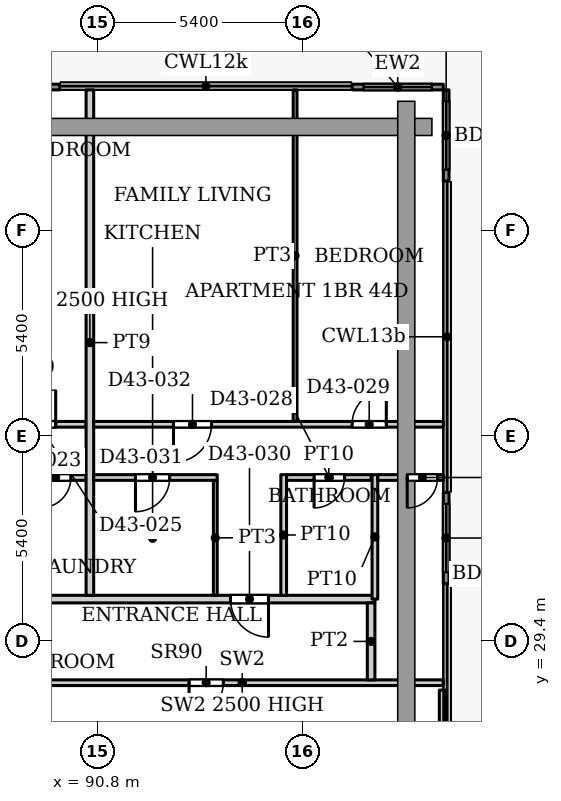
"""IFC4 building model, lengths in metres.
Left out: names, types, materials, properties, quantities, classifications, styles, units other than length and angle.
Written with IfcOpenShell. Run it as: python <this file> out.ifc"""

import sys

from ifc_helpers import new_model, si_unit, direction, frame, frame_2d, origin, place, context, subcontext, project, spatial, rectangle, extrude, source, transform, mapped, element, fill, save


model = new_model("IFC4")
c1 = context("Model", 3, precision=1e-05, world=origin(), true_north=direction((0.0, 1.0)))
c2 = subcontext(c1, "Body", "Model", "MODEL_VIEW")
j1 = project(units=[si_unit("LENGTHUNIT", "METRE"), si_unit("PLANEANGLEUNIT", "RADIAN")], contexts=[c1])
p1 = place(None, origin())
s1 = spatial("IfcSite", under=j1, at=p1, CompositionType="ELEMENT")
p2 = place(p1, origin())
s2 = spatial("IfcBuilding", under=s1, at=p2, CompositionType="ELEMENT")
p3 = place(p2, frame((0.0, 0.0, 187.7)))
s3 = spatial("IfcBuildingStorey", under=s2, at=p3, CompositionType="ELEMENT", Elevation=187.7)
p4 = place(p3, frame((87.406, 43.975, 0.0), z_axis=(0.0, 0.0, 1.0), x_axis=(1.0, 0.0, 0.0)))
e1 = element("IfcWall", 1, at=p4, inside=s3, PredefinedType="SOLIDWALL", context=c2, shape_type="SweptSolid", body=[
    extrude(rectangle(XDim=2.4, YDim=0.15, at=frame_2d((1.2, 0.0))), origin(), (0.0, 0.0, 1.0), 3.75),
])
p5 = place(p4, frame((0.3, 0.0, 0.0)))
e2 = element("IfcOpeningElement", 2, at=p5, cuts=e1, PredefinedType="OPENING", context=c2, shape_type="SweptSolid", body=[
    extrude(rectangle(XDim=1.8, YDim=2.4, at=frame_2d((0.9, 1.2))), frame((0.0, 0.085, 0.0), z_axis=(0.0, -1.0, 0.0), x_axis=(1.0, 0.0, 0.0)), (0.0, 0.0, 1.0), 0.17),
])
p6 = place(p3, frame((97.5, 43.975, 0.0), z_axis=(0.0, 0.0, 1.0), x_axis=(1.0, 0.0, 0.0)))
e3 = element("IfcWall", 3, at=p6, inside=s3, PredefinedType="SOLIDWALL", context=c2, shape_type="SweptSolid", body=[
    extrude(rectangle(XDim=2.4, YDim=0.15, at=frame_2d((1.2, 0.0))), origin(), (0.0, 0.0, 1.0), 3.75),
])
p7 = place(p6, frame((0.3, 0.0, 0.0)))
e4 = element("IfcOpeningElement", 4, at=p7, cuts=e3, PredefinedType="OPENING", context=c2, shape_type="SweptSolid", body=[
    extrude(rectangle(XDim=1.8, YDim=2.4, at=frame_2d((0.9, 1.2))), frame((0.0, 0.085, 0.0), z_axis=(0.0, -1.0, 0.0), x_axis=(1.0, 0.0, 0.0)), (0.0, 0.0, 1.0), 0.17),
])
p8 = place(p3, frame((99.975, 43.9, 0.0), z_axis=(0.0, 0.0, 1.0), x_axis=(0.0, -1.0, 0.0)))
e5 = element("IfcWall", 5, at=p8, inside=s3, PredefinedType="SOLIDWALL", context=c2, shape_type="SweptSolid", body=[
    extrude(rectangle(XDim=2.4, YDim=0.15, at=frame_2d((1.2, 0.0))), origin(), (0.0, 0.0, 1.0), 3.75),
])
p9 = place(p8, frame((0.3, 0.0, 0.0)))
e6 = element("IfcOpeningElement", 6, at=p9, cuts=e5, PredefinedType="OPENING", context=c2, shape_type="SweptSolid", body=[
    extrude(rectangle(XDim=1.8, YDim=2.4, at=frame_2d((0.9, 1.2))), frame((0.0, 0.085, 0.0), z_axis=(0.0, -1.0, 0.0), x_axis=(1.0, 0.0, 0.0)), (0.0, 0.0, 1.0), 0.17),
])
p10 = place(p3, frame((99.975, 33.307, 0.0), z_axis=(0.0, 0.0, 1.0), x_axis=(0.0, -1.0, 0.0)))
e7 = element("IfcWall", 7, at=p10, inside=s3, PredefinedType="SOLIDWALL", context=c2, shape_type="SweptSolid", body=[
    extrude(rectangle(XDim=2.4, YDim=0.15, at=frame_2d((1.2, 0.0))), origin(), (0.0, 0.0, 1.0), 3.75),
])
p11 = place(p10, frame((0.3, 0.0, 0.0)))
e8 = element("IfcOpeningElement", 8, at=p11, cuts=e7, PredefinedType="OPENING", context=c2, shape_type="SweptSolid", body=[
    extrude(rectangle(XDim=1.8, YDim=2.4, at=frame_2d((0.9, 1.2))), frame((0.0, 0.085, 0.0), z_axis=(0.0, -1.0, 0.0), x_axis=(1.0, 0.0, 0.0)), (0.0, 0.0, 1.0), 0.17),
])
p12 = place(p3, frame((89.32, 28.3, 0.0), z_axis=(0.0, 0.0, 1.0), x_axis=(1.0, 0.0, 0.0)))
e9 = element("IfcWall", 9, at=p12, inside=s3, PredefinedType="PARTITIONING", context=c2, shape_type="SweptSolid", body=[
    extrude(rectangle(XDim=10.578, YDim=0.15, at=frame_2d((5.289, 0.0))), origin(), (0.0, 0.0, 1.0), 2.5),
])
p13 = place(p12, frame((3.89, 0.0, 0.0)))
e10 = element("IfcOpeningElement", 10, at=p13, cuts=e9, PredefinedType="OPENING", context=c2, shape_type="SweptSolid", body=[
    extrude(rectangle(XDim=0.9, YDim=2.2, at=frame_2d((0.45, 1.1))), frame((0.0, 0.085, 0.0), z_axis=(0.0, -1.0, 0.0), x_axis=(1.0, 0.0, 0.0)), (0.0, 0.0, 1.0), 0.17),
])
p14 = place(p3, frame((99.87, 21.015, 0.0), z_axis=(0.0, 0.0, 1.0), x_axis=(0.0, 1.0, 0.0)))
e11 = element("IfcWall", 11, at=p14, inside=s3, PredefinedType="PARTITIONING", context=c2, shape_type="SweptSolid", body=[
    extrude(rectangle(XDim=7.09, YDim=0.15, at=frame_2d((3.545, 0.0))), origin(), (0.0, 0.0, 1.0), 3.9),
])
p15 = place(p3, frame((53.549, 30.5, 0.0), z_axis=(0.0, 0.0, 1.0), x_axis=(1.0, 0.0, 0.0)))
e12 = element("IfcWall", 12, at=p15, inside=s3, PredefinedType="PARTITIONING", context=c2, shape_type="SweptSolid", body=[
    extrude(rectangle(XDim=44.551, YDim=0.2, at=frame_2d((22.275, 0.0))), origin(), (0.0, 0.0, 1.0), 3.6),
])
p16 = place(p15, frame((8.351, 0.0, 0.0)))
e13 = element("IfcOpeningElement", 13, at=p16, cuts=e12, PredefinedType="OPENING", context=c2, shape_type="SweptSolid", body=[
    extrude(rectangle(XDim=1.0, YDim=2.1, at=frame_2d((0.5, 1.05))), frame((0.0, 0.11, 0.0), z_axis=(0.0, -1.0, 0.0), x_axis=(1.0, 0.0, 0.0)), (0.0, 0.0, 1.0), 0.22),
])
p17 = place(p15, frame((12.551, 0.0, 0.0)))
e14 = element("IfcOpeningElement", 14, at=p17, cuts=e12, PredefinedType="OPENING", context=c2, shape_type="SweptSolid", body=[
    extrude(rectangle(XDim=1.0, YDim=2.1, at=frame_2d((0.5, 1.05))), frame((0.0, 0.11, 0.0), z_axis=(0.0, -1.0, 0.0), x_axis=(1.0, 0.0, 0.0)), (0.0, 0.0, 1.0), 0.22),
])
p18 = place(p15, frame((28.751, 0.0, 0.0)))
e15 = element("IfcOpeningElement", 15, at=p18, cuts=e12, PredefinedType="OPENING", context=c2, shape_type="SweptSolid", body=[
    extrude(rectangle(XDim=1.0, YDim=2.1, at=frame_2d((0.5, 1.05))), frame((0.0, 0.11, 0.0), z_axis=(0.0, -1.0, 0.0), x_axis=(1.0, 0.0, 0.0)), (0.0, 0.0, 1.0), 0.22),
])
p19 = place(p15, frame((40.751, 0.0, 0.0)))
e16 = element("IfcOpeningElement", 16, at=p19, cuts=e12, PredefinedType="OPENING", context=c2, shape_type="SweptSolid", body=[
    extrude(rectangle(XDim=1.0, YDim=2.1, at=frame_2d((0.5, 1.05))), frame((0.0, 0.11, 0.0), z_axis=(0.0, -1.0, 0.0), x_axis=(1.0, 0.0, 0.0)), (0.0, 0.0, 1.0), 0.22),
])
p20 = place(p3, frame((79.0, 35.1, 0.0), z_axis=(0.0, 0.0, 1.0), x_axis=(1.0, 0.0, 0.0)))
e17 = element("IfcWall", 17, at=p20, inside=s3, PredefinedType="PARTITIONING", context=c2, shape_type="SweptSolid", body=[
    extrude(rectangle(XDim=11.5, YDim=0.15, at=frame_2d((5.75, 0.0))), origin(), (0.0, 0.0, 1.0), 3.6),
])
p21 = place(p20, frame((0.95, 0.0, 0.0)))
e18 = element("IfcOpeningElement", 18, at=p21, cuts=e17, PredefinedType="OPENING", context=c2, shape_type="SweptSolid", body=[
    extrude(rectangle(XDim=0.9, YDim=2.1, at=frame_2d((0.45, 1.05))), frame((0.0, 0.085, 0.0), z_axis=(0.0, -1.0, 0.0), x_axis=(1.0, 0.0, 0.0)), (0.0, 0.0, 1.0), 0.17),
])
p22 = place(p20, frame((4.35, 0.0, 0.0)))
e19 = element("IfcOpeningElement", 19, at=p22, cuts=e17, PredefinedType="OPENING", context=c2, shape_type="SweptSolid", body=[
    extrude(rectangle(XDim=1.0, YDim=2.1, at=frame_2d((0.5, 1.05))), frame((0.0, 0.085, 0.0), z_axis=(0.0, -1.0, 0.0), x_axis=(1.0, 0.0, 0.0)), (0.0, 0.0, 1.0), 0.17),
])
p23 = place(p20, frame((9.8, 0.0, 0.0)))
e20 = element("IfcOpeningElement", 20, at=p23, cuts=e17, PredefinedType="OPENING", context=c2, shape_type="SweptSolid", body=[
    extrude(rectangle(XDim=0.9, YDim=2.1, at=frame_2d((0.45, 1.05))), frame((0.0, 0.085, 0.0), z_axis=(0.0, -1.0, 0.0), x_axis=(1.0, 0.0, 0.0)), (0.0, 0.0, 1.0), 0.17),
])
p24 = place(p3, frame((83.625, 33.7, 0.0), z_axis=(0.0, 0.0, 1.0), x_axis=(1.0, 0.0, 0.0)))
e21 = element("IfcWall", 21, at=p24, inside=s3, PredefinedType="PARTITIONING", context=c2, shape_type="SweptSolid", body=[
    extrude(rectangle(XDim=6.875, YDim=0.15, at=frame_2d((3.438, 0.0))), origin(), (0.0, 0.0, 1.0), 3.6),
])
p25 = place(p24, frame((3.725, 0.0, 0.0)))
e22 = element("IfcOpeningElement", 22, at=p25, cuts=e21, PredefinedType="OPENING", context=c2, shape_type="SweptSolid", body=[
    extrude(rectangle(XDim=0.8, YDim=2.1, at=frame_2d((0.4, 1.05))), frame((0.0, 0.085, 0.0), z_axis=(0.0, -1.0, 0.0), x_axis=(1.0, 0.0, 0.0)), (0.0, 0.0, 1.0), 0.17),
])
p26 = place(p24, frame((5.675, 0.0, 0.0)))
e23 = element("IfcOpeningElement", 23, at=p26, cuts=e21, PredefinedType="OPENING", context=c2, shape_type="SweptSolid", body=[
    extrude(rectangle(XDim=0.8, YDim=2.1, at=frame_2d((0.4, 1.05))), frame((0.0, 0.085, 0.0), z_axis=(0.0, -1.0, 0.0), x_axis=(1.0, 0.0, 0.0)), (0.0, 0.0, 1.0), 0.17),
])
p27 = place(p24, frame((1.925, 0.0, 0.0)))
e24 = element("IfcOpeningElement", 24, at=p27, cuts=e21, PredefinedType="OPENING", context=c2, shape_type="SweptSolid", body=[
    extrude(rectangle(XDim=0.8, YDim=2.1, at=frame_2d((0.4, 1.05))), frame((0.0, 0.085, 0.0), z_axis=(0.0, -1.0, 0.0), x_axis=(1.0, 0.0, 0.0)), (0.0, 0.0, 1.0), 0.17),
])
p28 = place(p24, frame((0.425, 0.0, 0.0)))
e25 = element("IfcOpeningElement", 25, at=p28, cuts=e21, PredefinedType="OPENING", context=c2, shape_type="SweptSolid", body=[
    extrude(rectangle(XDim=0.8, YDim=2.1, at=frame_2d((0.4, 1.05))), frame((0.0, 0.085, 0.0), z_axis=(0.0, -1.0, 0.0), x_axis=(1.0, 0.0, 0.0)), (0.0, 0.0, 1.0), 0.17),
])
p29 = place(p3, frame((90.6, 30.6, 0.0), z_axis=(0.0, 0.0, 1.0), x_axis=(0.0, 1.0, 0.0)))
e26 = element("IfcWall", 26, at=p29, inside=s3, PredefinedType="PARTITIONING", context=c2, shape_type="SweptSolid", body=[
    extrude(rectangle(XDim=13.3, YDim=0.2, at=frame_2d((6.65, 0.0))), origin(), (0.0, 0.0, 1.0), 2.5),
])
p30 = place(p3, frame((90.7, 33.7, 0.0), z_axis=(0.0, 0.0, 1.0), x_axis=(1.0, 0.0, 0.0)))
e27 = element("IfcWall", 27, at=p30, inside=s3, PredefinedType="PARTITIONING", context=c2, shape_type="SweptSolid", body=[
    extrude(rectangle(XDim=3.25, YDim=0.15, at=frame_2d((1.625, 0.0))), origin(), (0.0, 0.0, 1.0), 3.6),
])
p31 = place(p30, frame((1.1, 0.0, 0.0)))
e28 = element("IfcOpeningElement", 28, at=p31, cuts=e27, PredefinedType="OPENING", context=c2, shape_type="SweptSolid", body=[
    extrude(rectangle(XDim=0.9, YDim=2.1, at=frame_2d((0.45, 1.05))), frame((0.0, 0.085, 0.0), z_axis=(0.0, -1.0, 0.0), x_axis=(1.0, 0.0, 0.0)), (0.0, 0.0, 1.0), 0.17),
])
p32 = place(p3, frame((90.7, 35.1, 0.0), z_axis=(0.0, 0.0, 1.0), x_axis=(1.0, 0.0, 0.0)))
e29 = element("IfcWall", 29, at=p32, inside=s3, PredefinedType="PARTITIONING", context=c2, shape_type="SweptSolid", body=[
    extrude(rectangle(XDim=9.2, YDim=0.15, at=frame_2d((4.6, 0.0))), origin(), (0.0, 0.0, 1.0), 3.6),
])
p33 = place(p32, frame((6.8, 0.0, 0.0)))
e30 = element("IfcOpeningElement", 30, at=p33, cuts=e29, PredefinedType="OPENING", context=c2, shape_type="SweptSolid", body=[
    extrude(rectangle(XDim=0.9, YDim=2.1, at=frame_2d((0.45, 1.05))), frame((0.0, 0.085, 0.0), z_axis=(0.0, -1.0, 0.0), x_axis=(1.0, 0.0, 0.0)), (0.0, 0.0, 1.0), 0.17),
])
p34 = place(p32, frame((2.1, 0.0, 0.0)))
e31 = element("IfcOpeningElement", 31, at=p34, cuts=e29, PredefinedType="OPENING", context=c2, shape_type="SweptSolid", body=[
    extrude(rectangle(XDim=1.0, YDim=2.1, at=frame_2d((0.5, 1.05))), frame((0.0, 0.085, 0.0), z_axis=(0.0, -1.0, 0.0), x_axis=(1.0, 0.0, 0.0)), (0.0, 0.0, 1.0), 0.17),
])
p35 = place(p3, frame((93.9, 30.6, 0.0), z_axis=(0.0, 0.0, 1.0), x_axis=(0.0, 1.0, 0.0)))
e32 = element("IfcWall", 32, at=p35, inside=s3, PredefinedType="PARTITIONING", context=c2, shape_type="SweptSolid", body=[
    extrude(rectangle(XDim=3.025, YDim=0.1, at=frame_2d((1.512, 0.0))), origin(), (0.0, 0.0, 1.0), 3.6),
])
p36 = place(p3, frame((95.7, 30.6, 0.0), z_axis=(0.0, 0.0, 1.0), x_axis=(0.0, 1.0, 0.0)))
e33 = element("IfcWall", 33, at=p36, inside=s3, PredefinedType="PARTITIONING", context=c2, shape_type="SweptSolid", body=[
    extrude(rectangle(XDim=3.175, YDim=0.15, at=frame_2d((1.587, 0.0))), origin(), (0.0, 0.0, 1.0), 3.6),
])
p37 = place(p3, frame((95.775, 33.7, 0.0), z_axis=(0.0, 0.0, 1.0), x_axis=(1.0, 0.0, 0.0)))
e34 = element("IfcWall", 34, at=p37, inside=s3, PredefinedType="PARTITIONING", context=c2, shape_type="SweptSolid", body=[
    extrude(rectangle(XDim=2.225, YDim=0.15, at=frame_2d((1.113, 0.0))), origin(), (0.0, 0.0, 1.0), 3.6),
])
p38 = place(p37, frame((0.725, 0.0, 0.0)))
e35 = element("IfcOpeningElement", 35, at=p38, cuts=e34, PredefinedType="OPENING", context=c2, shape_type="SweptSolid", body=[
    extrude(rectangle(XDim=0.8, YDim=2.1, at=frame_2d((0.4, 1.05))), frame((0.0, 0.085, 0.0), z_axis=(0.0, -1.0, 0.0), x_axis=(1.0, 0.0, 0.0)), (0.0, 0.0, 1.0), 0.17),
])
p39 = place(p3, frame((96.0, 35.175, 0.0), z_axis=(0.0, 0.0, 1.0), x_axis=(0.0, 1.0, 0.0)))
e36 = element("IfcWall", 36, at=p39, inside=s3, PredefinedType="PARTITIONING", context=c2, shape_type="SweptSolid", body=[
    extrude(rectangle(XDim=8.725, YDim=0.1, at=frame_2d((4.362, 0.0))), origin(), (0.0, 0.0, 1.0), 3.6),
])
p40 = place(p3, frame((98.0, 28.374, 0.0), z_axis=(0.0, 0.0, 1.0), x_axis=(0.0, 1.0, 0.0)))
e37 = element("IfcWall", 37, at=p40, inside=s3, PredefinedType="PARTITIONING", context=c2, shape_type="SweptSolid", body=[
    extrude(rectangle(XDim=2.026, YDim=0.2, at=frame_2d((1.013, 0.0))), origin(), (0.0, 0.0, 1.0), 3.6),
])
p41 = place(p3, frame((98.1, 30.5, 0.0), z_axis=(0.0, 0.0, 1.0), x_axis=(0.0, 1.0, 0.0)))
e38 = element("IfcWall", 38, at=p41, inside=s3, PredefinedType="PARTITIONING", context=c2, shape_type="SweptSolid", body=[
    extrude(rectangle(XDim=3.275, YDim=0.15, at=frame_2d((1.637, 0.0))), origin(), (0.0, 0.0, 1.0), 3.6),
])
p42 = place(p3, frame((98.175, 33.7, 0.0), z_axis=(0.0, 0.0, 1.0), x_axis=(1.0, 0.0, 0.0)))
e39 = element("IfcWall", 39, at=p42, inside=s3, PredefinedType="PARTITIONING", context=c2, shape_type="SweptSolid", body=[
    extrude(rectangle(XDim=1.725, YDim=0.15, at=frame_2d((0.862, 0.0))), origin(), (0.0, 0.0, 1.0), 3.6),
])
p43 = place(p42, frame((0.775, 0.0, 0.0)))
e40 = element("IfcOpeningElement", 40, at=p43, cuts=e39, PredefinedType="OPENING", context=c2, shape_type="SweptSolid", body=[
    extrude(rectangle(XDim=0.8, YDim=2.1, at=frame_2d((0.4, 1.05))), frame((0.0, 0.085, 0.0), z_axis=(0.0, -1.0, 0.0), x_axis=(1.0, 0.0, 0.0)), (0.0, 0.0, 1.0), 0.17),
])
m1 = source(origin(), c2, "Body", "SweptSolid", [
    extrude(rectangle(XDim=1.8, YDim=2.4, at=frame_2d((0.9, 1.2))), frame((0.0, 0.025, 0.0), z_axis=(0.0, -1.0, 0.0), x_axis=(1.0, 0.0, 0.0)), (0.0, 0.0, 1.0), 0.05),
])
p44 = place(p7, origin())
e41 = element("IfcDoor", 41, at=p44, inside=s3, OperationType="SLIDING_TO_LEFT", PredefinedType="DOOR", context=c2, shape_type="MappedRepresentation", body=[
    mapped(m1, transform((0.0, 0.0, 0.0), x_axis=(1.0, 0.0, 0.0), y_axis=(0.0, 1.0, 0.0), z_axis=(0.0, 0.0, 1.0), scale=1.0)),
])
fill(e4, e41)
p45 = place(p9, origin())
e42 = element("IfcDoor", 42, at=p45, inside=s3, OperationType="SLIDING_TO_LEFT", PredefinedType="DOOR", context=c2, shape_type="MappedRepresentation", body=[
    mapped(m1, transform((0.0, 0.0, 0.0), x_axis=(1.0, 0.0, 0.0), y_axis=(0.0, 1.0, 0.0), z_axis=(0.0, 0.0, 1.0), scale=1.0)),
])
fill(e6, e42)
p46 = place(p11, origin())
e43 = element("IfcDoor", 43, at=p46, inside=s3, OperationType="SLIDING_TO_LEFT", PredefinedType="DOOR", context=c2, shape_type="MappedRepresentation", body=[
    mapped(m1, transform((0.0, 0.0, 0.0), x_axis=(1.0, 0.0, 0.0), y_axis=(0.0, 1.0, 0.0), z_axis=(0.0, 0.0, 1.0), scale=1.0)),
])
fill(e8, e43)
m2 = source(origin(), c2, "Body", "SweptSolid", [
    extrude(rectangle(XDim=0.9, YDim=2.2, at=frame_2d((0.45, 1.1))), frame((0.0, 0.025, 0.0), z_axis=(0.0, -1.0, 0.0), x_axis=(1.0, 0.0, 0.0)), (0.0, 0.0, 1.0), 0.05),
])
p47 = place(p13, origin())
e44 = element("IfcDoor", 44, at=p47, inside=s3, OperationType="SINGLE_SWING_RIGHT", PredefinedType="DOOR", context=c2, shape_type="MappedRepresentation", body=[
    mapped(m2, transform((0.0, 0.0, 0.0), x_axis=(1.0, 0.0, 0.0), y_axis=(0.0, 1.0, 0.0), z_axis=(0.0, 0.0, 1.0), scale=1.0)),
])
fill(e10, e44)
m3 = source(origin(), c2, "Body", "SweptSolid", [
    extrude(rectangle(XDim=0.8, YDim=2.1, at=frame_2d((0.4, 1.05))), frame((0.0, 0.025, 0.0), z_axis=(0.0, -1.0, 0.0), x_axis=(1.0, 0.0, 0.0)), (0.0, 0.0, 1.0), 0.05),
])
p48 = place(p26, origin())
e45 = element("IfcDoor", 45, at=p48, inside=s3, OperationType="SINGLE_SWING_RIGHT", PredefinedType="DOOR", context=c2, shape_type="MappedRepresentation", body=[
    mapped(m3, transform((0.0, 0.0, 0.0), x_axis=(1.0, 0.0, 0.0), y_axis=(0.0, 1.0, 0.0), z_axis=(0.0, 0.0, 1.0), scale=1.0)),
])
fill(e23, e45)
m4 = source(origin(), c2, "Body", "SweptSolid", [
    extrude(rectangle(XDim=0.9, YDim=2.1, at=frame_2d((0.45, 1.05))), frame((0.0, 0.025, 0.0), z_axis=(0.0, -1.0, 0.0), x_axis=(1.0, 0.0, 0.0)), (0.0, 0.0, 1.0), 0.05),
])
p49 = place(p23, origin())
e46 = element("IfcDoor", 46, at=p49, inside=s3, OperationType="SINGLE_SWING_LEFT", PredefinedType="DOOR", context=c2, shape_type="MappedRepresentation", body=[
    mapped(m4, transform((0.0, 0.0, 0.0), x_axis=(1.0, 0.0, 0.0), y_axis=(0.0, 1.0, 0.0), z_axis=(0.0, 0.0, 1.0), scale=1.0)),
])
fill(e20, e46)
p50 = place(p38, origin())
e47 = element("IfcDoor", 47, at=p50, inside=s3, OperationType="SINGLE_SWING_RIGHT", PredefinedType="DOOR", context=c2, shape_type="MappedRepresentation", body=[
    mapped(m3, transform((0.0, 0.0, 0.0), x_axis=(1.0, 0.0, 0.0), y_axis=(0.0, 1.0, 0.0), z_axis=(0.0, 0.0, 1.0), scale=1.0)),
])
fill(e35, e47)
p51 = place(p33, origin())
e48 = element("IfcDoor", 48, at=p51, inside=s3, OperationType="SINGLE_SWING_LEFT", PredefinedType="DOOR", context=c2, shape_type="MappedRepresentation", body=[
    mapped(m4, transform((0.0, 0.0, 0.0), x_axis=(1.0, 0.0, 0.0), y_axis=(0.0, 1.0, 0.0), z_axis=(0.0, 0.0, 1.0), scale=1.0)),
])
fill(e30, e48)
m5 = source(origin(), c2, "Body", "SweptSolid", [
    extrude(rectangle(XDim=1.0, YDim=2.1, at=frame_2d((0.5, 1.05))), frame((0.0, 0.025, 0.0), z_axis=(0.0, -1.0, 0.0), x_axis=(1.0, 0.0, 0.0)), (0.0, 0.0, 1.0), 0.05),
])
p52 = place(p19, origin())
e49 = element("IfcDoor", 49, at=p52, inside=s3, OperationType="SINGLE_SWING_RIGHT", PredefinedType="DOOR", context=c2, shape_type="MappedRepresentation", body=[
    mapped(m5, transform((0.0, 0.0, 0.0), x_axis=(1.0, 0.0, 0.0), y_axis=(0.0, 1.0, 0.0), z_axis=(0.0, 0.0, 1.0), scale=1.0)),
])
fill(e16, e49)
p53 = place(p31, origin())
e50 = element("IfcDoor", 50, at=p53, inside=s3, OperationType="SINGLE_SWING_RIGHT", PredefinedType="DOOR", context=c2, shape_type="MappedRepresentation", body=[
    mapped(m4, transform((0.0, 0.0, 0.0), x_axis=(1.0, 0.0, 0.0), y_axis=(0.0, 1.0, 0.0), z_axis=(0.0, 0.0, 1.0), scale=1.0)),
])
fill(e28, e50)
m6 = source(origin(), c2, "Body", "SweptSolid", [
    extrude(rectangle(XDim=1.0, YDim=2.1, at=frame_2d((0.5, 1.05))), frame((0.0, 0.025, 0.0), z_axis=(0.0, -1.0, 0.0), x_axis=(1.0, 0.0, 0.0)), (0.0, 0.0, 1.0), 0.05),
])
p54 = place(p34, origin())
e51 = element("IfcDoor", 51, at=p54, inside=s3, OperationType="SINGLE_SWING_RIGHT", PredefinedType="DOOR", context=c2, shape_type="MappedRepresentation", body=[
    mapped(m6, transform((0.0, 0.0, 0.0), x_axis=(1.0, 0.0, 0.0), y_axis=(0.0, 1.0, 0.0), z_axis=(0.0, 0.0, 1.0), scale=1.0)),
])
fill(e31, e51)
p55 = place(p43, origin())
e52 = element("IfcDoor", 52, at=p55, inside=s3, OperationType="SINGLE_SWING_RIGHT", PredefinedType="DOOR", context=c2, shape_type="MappedRepresentation", body=[
    mapped(m3, transform((0.0, 0.0, 0.0), x_axis=(1.0, 0.0, 0.0), y_axis=(0.0, 1.0, 0.0), z_axis=(0.0, 0.0, 1.0), scale=1.0)),
])
fill(e40, e52)
save(model, sys.argv[1])
